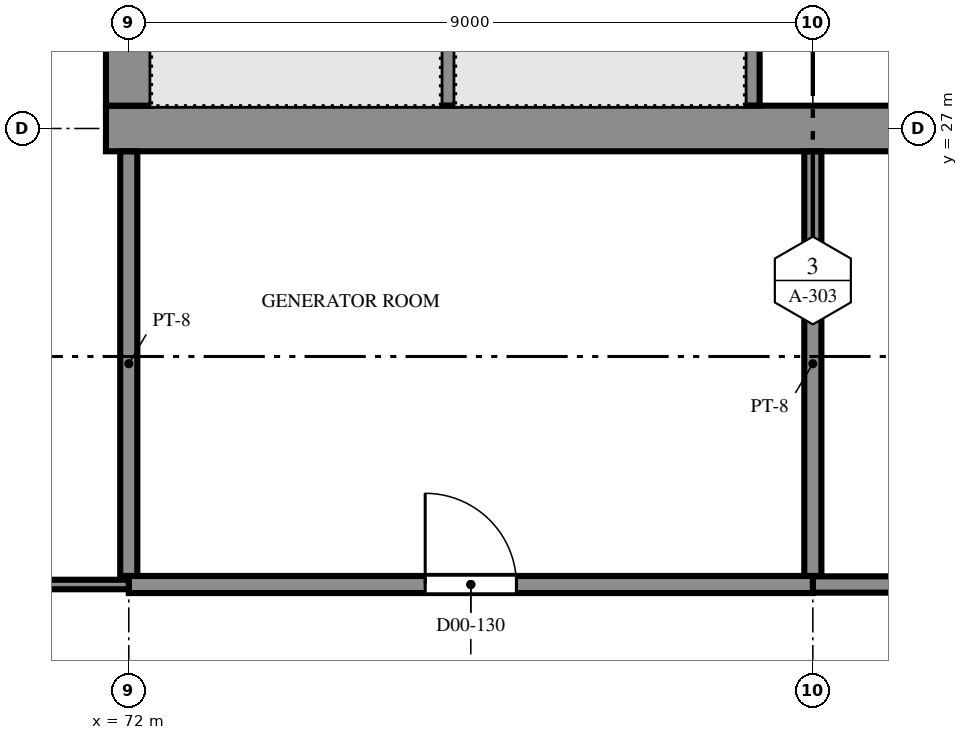
"""IFC4 building model, lengths in metres.
Left out: names, types, materials, properties, quantities, classifications, styles, units other than length and angle.
Written with IfcOpenShell. Run it as: python <this file> out.ifc"""

import sys

from ifc_helpers import new_model, si_unit, direction, frame, frame_2d, origin, place, context, subcontext, project, spatial, polyline, rectangle, outline, extrude, element, fill, save


model = new_model("IFC4")
c1 = context("Model", 3, precision=1e-05, world=origin(), true_north=direction((0.0, 1.0)))
c2 = subcontext(c1, "Body", "Model", "MODEL_VIEW")
j1 = project(units=[si_unit("LENGTHUNIT", "METRE"), si_unit("PLANEANGLEUNIT", "RADIAN")], contexts=[c1])
p1 = place(None, origin())
s1 = spatial("IfcSite", under=j1, at=p1, CompositionType="ELEMENT")
p2 = place(p1, origin())
s2 = spatial("IfcBuilding", under=s1, at=p2, CompositionType="ELEMENT")
p3 = place(p2, origin())
s3 = spatial("IfcBuildingStorey", under=s2, at=p3, CompositionType="ELEMENT", Elevation=0.0)
p4 = place(p3, frame((71.7, 27.0, -2.1), z_axis=(0.0, 0.0, 1.0), x_axis=(1.0, 0.0, 0.0)))
e1 = element("IfcWall", 1, at=p4, inside=s3, PredefinedType="SOLIDWALL", context=c2, shape_type="SweptSolid", body=[
    extrude(rectangle(XDim=18.6, YDim=0.6, at=frame_2d((9.3, 0.0))), origin(), (0.0, 0.0, 1.0), 9.6),
])
p5 = place(p3, frame((72.0, 27.3, -2.1), z_axis=(0.0, 0.0, 1.0), x_axis=(0.0, 1.0, 0.0)))
e2 = element("IfcWall", 2, at=p5, inside=s3, PredefinedType="SOLIDWALL", context=c2, shape_type="SweptSolid", body=[
    extrude(rectangle(XDim=8.4, YDim=0.6, at=frame_2d((4.2, 0.0))), origin(), (0.0, 0.0, 1.0), 9.6),
])
for number, where, z_axis, x_axis in (
    (3, (76.2, 27.302, 0.0), (0.0, 0.0, 1.0), (0.0, 1.0, 0.0)),
    (4, (80.2, 27.302, 0.0), (0.0, 0.0, 1.0), (0.0, 1.0, 0.0)),
):
    element("IfcWall", number, at=place(p3, frame(where, z_axis=z_axis, x_axis=x_axis)), inside=s3, PredefinedType="SOLIDWALL", context=c2, shape_type="SweptSolid", body=[
        extrude(rectangle(XDim=8.396, YDim=0.2, at=frame_2d((4.198, 0.0))), origin(), (0.0, 0.0, 1.0), 6.836),
    ])
p6 = place(p3, frame((81.0, 21.0, 0.0), z_axis=(0.0, 0.0, 1.0), x_axis=(1.0, 0.0, 0.0)))
e5 = element("IfcWall", 5, at=p6, inside=s3, PredefinedType="PARTITIONING", context=c2, shape_type="SweptSolid", body=[
    extrude(rectangle(XDim=9.0, YDim=0.215, at=frame_2d((4.5, 0.0))), origin(), (0.0, 0.0, 1.0), 6.6),
])
p7 = place(p6, frame((3.75, 0.0, 0.0)))
e6 = element("IfcOpeningElement", 6, at=p7, cuts=e5, PredefinedType="OPENING", context=c2, shape_type="SweptSolid", body=[
    extrude(rectangle(XDim=1.5, YDim=2.4, at=frame_2d((0.75, 1.2))), frame((0.0, 0.117, 0.0), z_axis=(0.0, -1.0, 0.0), x_axis=(1.0, 0.0, 0.0)), (0.0, 0.0, 1.0), 0.235),
])
p8 = place(p3, frame((72.0, 21.0, 0.0), z_axis=(0.0, 0.0, 1.0), x_axis=(1.0, 0.0, 0.0)))
e7 = element("IfcWall", 7, at=p8, inside=s3, PredefinedType="PARTITIONING", context=c2, shape_type="SweptSolid", body=[
    extrude(rectangle(XDim=9.0, YDim=0.225, at=frame_2d((4.5, 0.0))), origin(), (0.0, 0.0, 1.0), 6.6),
])
p9 = place(p8, frame((3.9, 0.0, 0.0)))
e8 = element("IfcOpeningElement", 8, at=p9, cuts=e7, PredefinedType="OPENING", context=c2, shape_type="SweptSolid", body=[
    extrude(rectangle(XDim=1.2, YDim=2.4, at=frame_2d((0.6, 1.2))), frame((0.0, 0.123, 0.0), z_axis=(0.0, -1.0, 0.0), x_axis=(1.0, 0.0, 0.0)), (0.0, 0.0, 1.0), 0.245),
])
p10 = place(p3, frame((63.162, 21.0, 0.0), z_axis=(0.0, 0.0, 1.0), x_axis=(1.0, 0.0, 0.0)))
e9 = element("IfcWall", 9, at=p10, inside=s3, PredefinedType="PARTITIONING", context=c2, shape_type="SweptSolid", body=[
    extrude(rectangle(XDim=8.838, YDim=0.125, at=frame_2d((4.419, 0.0))), origin(), (0.0, 0.0, 1.0), 6.757),
])
p11 = place(p10, frame((3.838, 0.0, 0.0)))
e10 = element("IfcOpeningElement", 10, at=p11, cuts=e9, PredefinedType="OPENING", context=c2, shape_type="SweptSolid", body=[
    extrude(rectangle(XDim=1.0, YDim=2.1, at=frame_2d((0.5, 1.05))), frame((0.0, 0.073, 0.0), z_axis=(0.0, -1.0, 0.0), x_axis=(1.0, 0.0, 0.0)), (0.0, 0.0, 1.0), 0.145),
])
for number, where, z_axis, x_axis in (
    (11, (72.0, 26.698, 0.0), (0.0, 0.0, 1.0), (0.0, -1.0, 0.0)),
    (12, (81.0, 26.698, 0.0), (0.0, 0.0, 1.0), (0.0, -1.0, 0.0)),
):
    element("IfcWall", number, at=place(p3, frame(where, z_axis=z_axis, x_axis=x_axis)), inside=s3, PredefinedType="PARTITIONING", context=c2, shape_type="SweptSolid", body=[
        extrude(rectangle(XDim=5.585, YDim=0.225, at=frame_2d((2.793, 0.0))), origin(), (0.0, 0.0, 1.0), 6.6),
    ])
p12 = place(p9, origin())
e13 = element("IfcDoor", 13, at=p12, inside=s3, OperationType="DOUBLE_DOOR_SINGLE_SWING", PredefinedType="DOOR", context=c2, shape_type="SweptSolid", body=[
    extrude(outline(polyline([(0.0, 0.0), (0.07, 0.0), (0.07, 2.33), (1.13, 2.33), (1.13, 0.0), (1.2, 0.0), (1.2, 2.4), (0.0, 2.4), (0.0, 0.0)])), frame((0.0, 0.025, 0.0), z_axis=(0.0, -1.0, 0.0), x_axis=(1.0, 0.0, 0.0)), (0.0, 0.0, 1.0), 0.05),
    extrude(outline(polyline([(0.074, 0.01), (0.597, 0.01), (0.597, 2.326), (0.074, 2.326), (0.074, 0.01)]), holes=[polyline([(0.178, 0.427), (0.492, 0.427), (0.492, 2.048), (0.178, 2.048), (0.178, 0.427)])]), frame((0.0, 0.017, 0.0), z_axis=(0.0, -1.0, 0.0), x_axis=(1.0, 0.0, 0.0)), (0.0, 0.0, 1.0), 0.035),
    extrude(rectangle(XDim=0.314, YDim=1.621, at=frame_2d((0.335, 1.237))), frame((0.0, 0.009, 0.0), z_axis=(0.0, -1.0, 0.0), x_axis=(1.0, 0.0, 0.0)), (0.0, 0.0, 1.0), 0.017),
    extrude(outline(polyline([(0.603, 0.01), (1.126, 0.01), (1.126, 2.326), (0.603, 2.326), (0.603, 0.01)]), holes=[polyline([(0.708, 0.427), (1.021, 0.427), (1.021, 2.048), (0.708, 2.048), (0.708, 0.427)])]), frame((0.0, 0.017, 0.0), z_axis=(0.0, -1.0, 0.0), x_axis=(1.0, 0.0, 0.0)), (0.0, 0.0, 1.0), 0.035),
    extrude(rectangle(XDim=0.314, YDim=1.621, at=frame_2d((0.865, 1.237))), frame((0.0, 0.009, 0.0), z_axis=(0.0, -1.0, 0.0), x_axis=(1.0, 0.0, 0.0)), (0.0, 0.0, 1.0), 0.017),
])
fill(e8, e13)
save(model, sys.argv[1])
